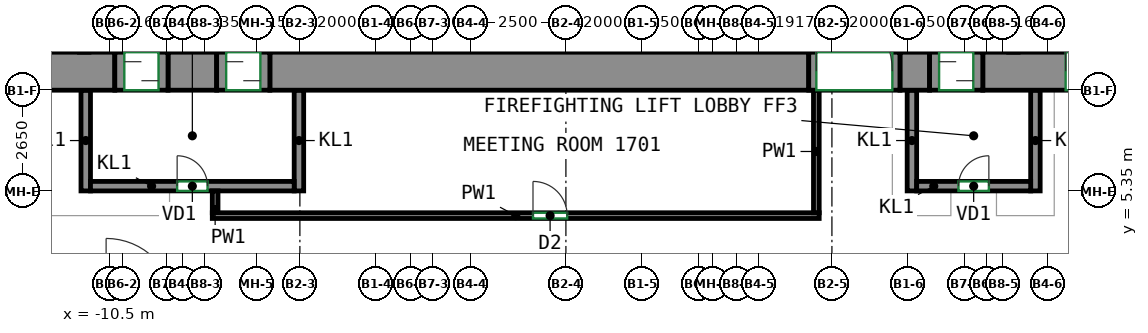
"""IFC4 building model, lengths in metres.
Left out: names, types, materials, properties, quantities, classifications, styles, units other than length and angle.
Written with IfcOpenShell. Run it as: python <this file> out.ifc"""

import sys

from ifc_helpers import new_model, si_unit, direction, frame, frame_2d, origin, place, context, subcontext, project, spatial, rectangle, extrude, source, transform, mapped, element, fill, save


model = new_model("IFC4")
c1 = context("Model", 3, precision=1e-05, world=origin(), true_north=direction((0.0, 1.0)))
c2 = subcontext(c1, "Body", "Model", "MODEL_VIEW")
j1 = project(units=[si_unit("LENGTHUNIT", "METRE"), si_unit("PLANEANGLEUNIT", "RADIAN")], contexts=[c1])
p1 = place(None, origin())
s1 = spatial("IfcSite", under=j1, at=p1, CompositionType="ELEMENT")
p2 = place(p1, origin())
s2 = spatial("IfcBuilding", under=s1, at=p2, CompositionType="ELEMENT")
p3 = place(p2, frame((0.0, 0.0, 75.2)))
s3 = spatial("IfcBuildingStorey", under=s2, at=p3, CompositionType="ELEMENT", Elevation=75.2)
m1 = source(origin(), c2, "Body", "SweptSolid", [
    extrude(rectangle(XDim=5.63, YDim=1.0, at=frame_2d((2.815, 0.0))), origin(), (0.0, 0.0, 1.0), 3.72),
])
p4 = place(p3, frame((-16.0, 8.5, 0.0), z_axis=(0.0, 0.0, 1.0), x_axis=(1.0, 0.0, 0.0)))
e1 = element("IfcWall", 1, at=p4, inside=s3, PredefinedType="SHEAR", context=c2, shape_type="MappedRepresentation", body=[
    mapped(m1, transform((0.0, 0.0, 0.0))),
])
p5 = place(p4, frame((2.25, 0.0, 0.0)))
e2 = element("IfcOpeningElement", 2, at=p5, cuts=e1, PredefinedType="OPENING", context=c2, shape_type="SweptSolid", body=[
    extrude(rectangle(XDim=1.2, YDim=2.1, at=frame_2d((0.6, 1.05))), frame((0.0, 0.51, 0.0), z_axis=(0.0, -1.0, 0.0), x_axis=(1.0, 0.0, 0.0)), (0.0, 0.0, 1.0), 1.02),
])
m2 = source(origin(), c2, "Body", "SweptSolid", [
    extrude(rectangle(XDim=1.28, YDim=1.0, at=frame_2d((0.64, 0.0))), origin(), (0.0, 0.0, 1.0), 3.72),
])
p6 = place(p3, frame((-8.97, 8.5, 0.0), z_axis=(0.0, 0.0, 1.0), x_axis=(1.0, 0.0, 0.0)))
e3 = element("IfcWall", 3, at=p6, inside=s3, PredefinedType="SHEAR", context=c2, shape_type="MappedRepresentation", body=[
    mapped(m2, transform((0.0, 0.0, 0.0))),
])
m3 = source(origin(), c2, "Body", "SweptSolid", [
    extrude(rectangle(XDim=14.18, YDim=1.0, at=frame_2d((7.09, 0.0))), origin(), (0.0, 0.0, 1.0), 3.72),
])
p7 = place(p3, frame((-6.29, 8.5, 0.0), z_axis=(0.0, 0.0, 1.0), x_axis=(1.0, 0.0, 0.0)))
e4 = element("IfcWall", 4, at=p7, inside=s3, PredefinedType="SHEAR", context=c2, shape_type="MappedRepresentation", body=[
    mapped(m3, transform((0.0, 0.0, 0.0))),
])
m4 = source(origin(), c2, "Body", "SweptSolid", [
    extrude(rectangle(XDim=0.78, YDim=1.0, at=frame_2d((0.39, 0.0))), origin(), (0.0, 0.0, 1.0), 3.72),
])
p8 = place(p3, frame((10.29, 8.5, 0.0), z_axis=(0.0, 0.0, 1.0), x_axis=(1.0, 0.0, 0.0)))
e5 = element("IfcWall", 5, at=p8, inside=s3, PredefinedType="SHEAR", context=c2, shape_type="MappedRepresentation", body=[
    mapped(m4, transform((0.0, 0.0, 0.0))),
])
m5 = source(origin(), c2, "Body", "SweptSolid", [
    extrude(rectangle(XDim=5.63, YDim=1.0, at=frame_2d((2.815, 0.0))), origin(), (0.0, 0.0, 1.0), 3.72),
])
p9 = place(p3, frame((12.47, 8.5, 0.0), z_axis=(0.0, 0.0, 1.0), x_axis=(1.0, 0.0, 0.0)))
e6 = element("IfcWall", 6, at=p9, inside=s3, PredefinedType="SHEAR", context=c2, shape_type="MappedRepresentation", body=[
    mapped(m5, transform((0.0, 0.0, 0.0))),
])
p10 = place(p9, frame((2.18, 0.0, 0.0)))
e7 = element("IfcOpeningElement", 7, at=p10, cuts=e6, PredefinedType="OPENING", context=c2, shape_type="SweptSolid", body=[
    extrude(rectangle(XDim=1.2, YDim=2.1, at=frame_2d((0.6, 1.05))), frame((0.0, 0.51, 0.0), z_axis=(0.0, -1.0, 0.0), x_axis=(1.0, 0.0, 0.0)), (0.0, 0.0, 1.0), 1.02),
])
m6 = source(origin(), c2, "Body", "SweptSolid", [
    extrude(rectangle(XDim=2.65, YDim=0.25, at=frame_2d((1.325, 0.0))), origin(), (0.0, 0.0, 1.0), 3.72),
])
for number, where, z_axis, x_axis in (
    (8, (-11.135, 5.35, 0.0), (0.0, 0.0, 1.0), (0.0, 1.0, 0.0)),
    (9, (-5.525, 5.35, 0.0), (0.0, 0.0, 1.0), (0.0, 1.0, 0.0)),
):
    element("IfcWall", number, at=place(p3, frame(where, z_axis=z_axis, x_axis=x_axis)), inside=s3, PredefinedType="PARTITIONING", context=c2, shape_type="MappedRepresentation", body=[
        mapped(m6, transform((0.0, 0.0, 0.0))),
    ])
m7 = source(origin(), c2, "Body", "SweptSolid", [
    extrude(rectangle(XDim=5.36, YDim=0.25, at=frame_2d((2.68, 0.0))), origin(), (0.0, 0.0, 1.0), 3.72),
])
p11 = place(p3, frame((-11.01, 5.475, 0.0), z_axis=(0.0, 0.0, 1.0), x_axis=(1.0, 0.0, 0.0)))
e10 = element("IfcWall", 10, at=p11, inside=s3, PredefinedType="PARTITIONING", context=c2, shape_type="MappedRepresentation", body=[
    mapped(m7, transform((0.0, 0.0, 0.0))),
])
p12 = place(p11, frame((2.28, 0.0, 0.0)))
e11 = element("IfcOpeningElement", 11, at=p12, cuts=e10, PredefinedType="OPENING", context=c2, shape_type="SweptSolid", body=[
    extrude(rectangle(XDim=0.8, YDim=2.0, at=frame_2d((0.4, 1.0))), frame((0.0, 0.135, 0.0), z_axis=(0.0, -1.0, 0.0), x_axis=(1.0, 0.0, 0.0)), (0.0, 0.0, 1.0), 0.27),
])
for number, where, z_axis, x_axis in (
    (12, (10.605, 5.35, 0.0), (0.0, 0.0, 1.0), (0.0, 1.0, 0.0)),
    (13, (13.855, 5.35, 0.0), (0.0, 0.0, 1.0), (0.0, 1.0, 0.0)),
):
    element("IfcWall", number, at=place(p3, frame(where, z_axis=z_axis, x_axis=x_axis)), inside=s3, PredefinedType="PARTITIONING", context=c2, shape_type="MappedRepresentation", body=[
        mapped(m6, transform((0.0, 0.0, 0.0))),
    ])
m8 = source(origin(), c2, "Body", "SweptSolid", [
    extrude(rectangle(XDim=3.0, YDim=0.25, at=frame_2d((1.5, 0.0))), origin(), (0.0, 0.0, 1.0), 3.72),
])
p13 = place(p3, frame((10.73, 5.475, 0.0), z_axis=(0.0, 0.0, 1.0), x_axis=(1.0, 0.0, 0.0)))
e14 = element("IfcWall", 14, at=p13, inside=s3, PredefinedType="PARTITIONING", context=c2, shape_type="MappedRepresentation", body=[
    mapped(m8, transform((0.0, 0.0, 0.0))),
])
p14 = place(p13, frame((1.1, 0.0, 0.0)))
e15 = element("IfcOpeningElement", 15, at=p14, cuts=e14, PredefinedType="OPENING", context=c2, shape_type="SweptSolid", body=[
    extrude(rectangle(XDim=0.8, YDim=2.0, at=frame_2d((0.4, 1.0))), frame((0.0, 0.135, 0.0), z_axis=(0.0, -1.0, 0.0), x_axis=(1.0, 0.0, 0.0)), (0.0, 0.0, 1.0), 0.27),
])
m9 = source(origin(), c2, "Body", "SweptSolid", [
    extrude(rectangle(XDim=1.4, YDim=1.0, at=frame_2d((0.7, 0.0))), origin(), (0.0, 0.0, 1.0), 2.7),
])
p15 = place(p3, frame((-10.37, 8.5, 0.0), z_axis=(0.0, 0.0, 1.0), x_axis=(1.0, 0.0, 0.0)))
e16 = element("IfcWall", 16, at=p15, inside=s3, PredefinedType="PARTITIONING", context=c2, shape_type="MappedRepresentation", body=[
    mapped(m9, transform((0.0, 0.0, 0.0))),
])
p16 = place(p15, frame((0.25, 0.0, 0.0)))
e17 = element("IfcOpeningElement", 17, at=p16, cuts=e16, PredefinedType="OPENING", context=c2, shape_type="SweptSolid", body=[
    extrude(rectangle(XDim=0.9, YDim=2.1, at=frame_2d((0.45, 1.05))), frame((0.0, 0.51, 0.0), z_axis=(0.0, -1.0, 0.0), x_axis=(1.0, 0.0, 0.0)), (0.0, 0.0, 1.0), 1.02),
])
m10 = source(origin(), c2, "Body", "SweptSolid", [
    extrude(rectangle(XDim=1.4, YDim=1.0, at=frame_2d((0.7, 0.0))), origin(), (0.0, 0.0, 1.0), 2.7),
])
p17 = place(p3, frame((-7.69, 8.5, 0.0), z_axis=(0.0, 0.0, 1.0), x_axis=(1.0, 0.0, 0.0)))
e18 = element("IfcWall", 18, at=p17, inside=s3, PredefinedType="PARTITIONING", context=c2, shape_type="MappedRepresentation", body=[
    mapped(m10, transform((0.0, 0.0, 0.0))),
])
p18 = place(p17, frame((0.25, 0.0, 0.0)))
e19 = element("IfcOpeningElement", 19, at=p18, cuts=e18, PredefinedType="OPENING", context=c2, shape_type="SweptSolid", body=[
    extrude(rectangle(XDim=0.9, YDim=2.1, at=frame_2d((0.45, 1.05))), frame((0.0, 0.51, 0.0), z_axis=(0.0, -1.0, 0.0), x_axis=(1.0, 0.0, 0.0)), (0.0, 0.0, 1.0), 1.02),
])
m11 = source(origin(), c2, "Body", "SweptSolid", [
    extrude(rectangle(XDim=2.4, YDim=1.0, at=frame_2d((1.2, 0.0))), origin(), (0.0, 0.0, 1.0), 2.7),
])
p19 = place(p3, frame((7.89, 8.5, 0.0), z_axis=(0.0, 0.0, 1.0), x_axis=(1.0, 0.0, 0.0)))
e20 = element("IfcWall", 20, at=p19, inside=s3, PredefinedType="PARTITIONING", context=c2, shape_type="MappedRepresentation", body=[
    mapped(m11, transform((0.0, 0.0, 0.0))),
])
p20 = place(p19, frame((0.2, 0.0, 0.0)))
e21 = element("IfcOpeningElement", 21, at=p20, cuts=e20, PredefinedType="OPENING", context=c2, shape_type="SweptSolid", body=[
    extrude(rectangle(XDim=2.0, YDim=2.1, at=frame_2d((1.0, 1.05))), frame((0.0, 0.51, 0.0), z_axis=(0.0, -1.0, 0.0), x_axis=(1.0, 0.0, 0.0)), (0.0, 0.0, 1.0), 1.02),
])
p21 = place(p3, frame((11.07, 8.5, 0.0), z_axis=(0.0, 0.0, 1.0), x_axis=(1.0, 0.0, 0.0)))
e22 = element("IfcWall", 22, at=p21, inside=s3, PredefinedType="PARTITIONING", context=c2, shape_type="MappedRepresentation", body=[
    mapped(m10, transform((0.0, 0.0, 0.0))),
])
p22 = place(p21, frame((0.25, 0.0, 0.0)))
e23 = element("IfcOpeningElement", 23, at=p22, cuts=e22, PredefinedType="OPENING", context=c2, shape_type="SweptSolid", body=[
    extrude(rectangle(XDim=0.9, YDim=2.1, at=frame_2d((0.45, 1.05))), frame((0.0, 0.51, 0.0), z_axis=(0.0, -1.0, 0.0), x_axis=(1.0, 0.0, 0.0)), (0.0, 0.0, 1.0), 1.02),
])
p23 = place(p3, frame((-7.73, 4.775, 0.0), z_axis=(0.0, 0.0, 1.0), x_axis=(0.0, 1.0, 0.0)))
e24 = element("IfcWall", 24, at=p23, inside=s3, PredefinedType="PARTITIONING", context=c2, shape_type="SweptSolid", body=[
    extrude(rectangle(XDim=0.575, YDim=0.15, at=frame_2d((0.288, 0.0))), origin(), (0.0, 0.0, 1.0), 3.72),
])
p24 = place(p3, frame((-7.805, 4.7, 0.0), z_axis=(0.0, 0.0, 1.0), x_axis=(1.0, 0.0, 0.0)))
e25 = element("IfcWall", 25, at=p24, inside=s3, PredefinedType="PARTITIONING", context=c2, shape_type="SweptSolid", body=[
    extrude(rectangle(XDim=15.97, YDim=0.15, at=frame_2d((7.985, 0.0))), origin(), (0.0, 0.0, 1.0), 3.72),
])
p25 = place(p24, frame((8.439, 0.0, 0.0)))
e26 = element("IfcOpeningElement", 26, at=p25, cuts=e25, PredefinedType="OPENING", context=c2, shape_type="SweptSolid", body=[
    extrude(rectangle(XDim=0.9, YDim=2.1, at=frame_2d((0.45, 1.05))), frame((0.0, 0.085, 0.0), z_axis=(0.0, -1.0, 0.0), x_axis=(1.0, 0.0, 0.0)), (0.0, 0.0, 1.0), 0.17),
])
p26 = place(p3, frame((8.09, 8.0, 0.0), z_axis=(0.0, 0.0, 1.0), x_axis=(0.0, -1.0, 0.0)))
e27 = element("IfcWall", 27, at=p26, inside=s3, PredefinedType="PARTITIONING", context=c2, shape_type="SweptSolid", body=[
    extrude(rectangle(XDim=3.225, YDim=0.15, at=frame_2d((1.613, 0.0))), origin(), (0.0, 0.0, 1.0), 3.72),
])
p27 = place(p20, origin())
e28 = element("IfcDoor", 28, at=p27, inside=s3, OperationType="DOUBLE_DOOR_SINGLE_SWING", PredefinedType="DOOR", context=c2, shape_type="SweptSolid", body=[
    extrude(rectangle(XDim=2.0, YDim=2.1, at=frame_2d((1.0, 1.05))), frame((0.0, 0.405, 0.0), z_axis=(0.0, -1.0, 0.0), x_axis=(1.0, 0.0, 0.0)), (0.0, 0.0, 1.0), 0.05),
])
fill(e21, e28)
p28 = place(p12, origin())
e29 = element("IfcDoor", 29, at=p28, inside=s3, OperationType="SINGLE_SWING_LEFT", PredefinedType="DOOR", context=c2, shape_type="SweptSolid", body=[
    extrude(rectangle(XDim=0.8, YDim=2.0, at=frame_2d((0.4, 1.0))), frame((0.0, 0.025, 0.0), z_axis=(0.0, -1.0, 0.0), x_axis=(1.0, 0.0, 0.0)), (0.0, 0.0, 1.0), 0.05),
])
fill(e11, e29)
p29 = place(p14, origin())
e30 = element("IfcDoor", 30, at=p29, inside=s3, OperationType="SINGLE_SWING_RIGHT", PredefinedType="DOOR", context=c2, shape_type="SweptSolid", body=[
    extrude(rectangle(XDim=0.8, YDim=2.0, at=frame_2d((0.4, 1.0))), frame((0.0, 0.025, 0.0), z_axis=(0.0, -1.0, 0.0), x_axis=(1.0, 0.0, 0.0)), (0.0, 0.0, 1.0), 0.05),
])
fill(e15, e30)
p30 = place(p16, origin())
e31 = element("IfcDoor", 31, at=p30, inside=s3, OperationType="SLIDING_TO_LEFT", PredefinedType="DOOR", context=c2, shape_type="SweptSolid", body=[
    extrude(rectangle(XDim=0.9, YDim=2.1, at=frame_2d((0.45, 1.05))), frame((0.0, 0.405, 0.0), z_axis=(0.0, -1.0, 0.0), x_axis=(1.0, 0.0, 0.0)), (0.0, 0.0, 1.0), 0.05),
])
fill(e17, e31)
p31 = place(p18, origin())
e32 = element("IfcDoor", 32, at=p31, inside=s3, OperationType="SLIDING_TO_RIGHT", PredefinedType="DOOR", context=c2, shape_type="SweptSolid", body=[
    extrude(rectangle(XDim=0.9, YDim=2.1, at=frame_2d((0.45, 1.05))), frame((0.0, 0.405, 0.0), z_axis=(0.0, -1.0, 0.0), x_axis=(1.0, 0.0, 0.0)), (0.0, 0.0, 1.0), 0.05),
])
fill(e19, e32)
p32 = place(p22, origin())
e33 = element("IfcDoor", 33, at=p32, inside=s3, OperationType="SLIDING_TO_LEFT", PredefinedType="DOOR", context=c2, shape_type="SweptSolid", body=[
    extrude(rectangle(XDim=0.9, YDim=2.1, at=frame_2d((0.45, 1.05))), frame((0.0, 0.405, 0.0), z_axis=(0.0, -1.0, 0.0), x_axis=(1.0, 0.0, 0.0)), (0.0, 0.0, 1.0), 0.05),
])
fill(e23, e33)
p33 = place(p10, origin())
e34 = element("IfcDoor", 34, at=p33, inside=s3, OperationType="DOUBLE_DOOR_SINGLE_SWING", PredefinedType="DOOR", context=c2, shape_type="SweptSolid", body=[
    extrude(rectangle(XDim=1.2, YDim=2.1, at=frame_2d((0.6, 1.05))), frame((0.0, 0.405, 0.0), z_axis=(0.0, -1.0, 0.0), x_axis=(1.0, 0.0, 0.0)), (0.0, 0.0, 1.0), 0.05),
])
fill(e7, e34)
p34 = place(p25, origin())
e35 = element("IfcDoor", 35, at=p34, inside=s3, OperationType="SINGLE_SWING_LEFT", PredefinedType="DOOR", context=c2, shape_type="SweptSolid", body=[
    extrude(rectangle(XDim=0.9, YDim=2.1, at=frame_2d((0.45, 1.05))), frame((0.0, 0.025, 0.0), z_axis=(0.0, -1.0, 0.0), x_axis=(1.0, 0.0, 0.0)), (0.0, 0.0, 1.0), 0.05),
])
fill(e26, e35)
save(model, sys.argv[1])
